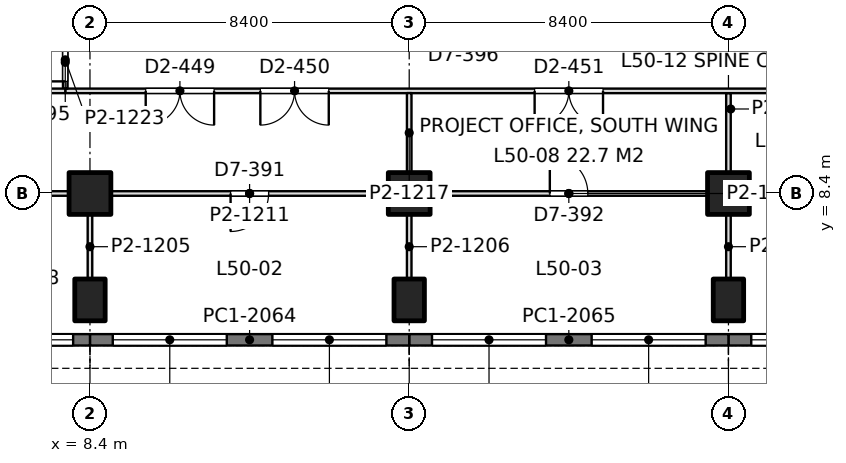
"""IFC4 building model, lengths in metres.
Left out: names, types, materials, properties, quantities, classifications, styles, units other than length and angle.
Written with IfcOpenShell. Run it as: python <this file> out.ifc"""

import sys

from ifc_helpers import new_model, si_unit, direction, frame, frame_2d, origin, origin_2d, place, context, subcontext, project, spatial, rectangle, extrude, element, fill, save


model = new_model("IFC4")
c1 = context("Model", 3, precision=1e-05, world=origin(), true_north=direction((0.0, 1.0)))
c2 = subcontext(c1, "Body", "Model", "MODEL_VIEW")
j1 = project(units=[si_unit("LENGTHUNIT", "METRE"), si_unit("PLANEANGLEUNIT", "RADIAN")], contexts=[c1])
p1 = place(None, origin())
s1 = spatial("IfcSite", under=j1, at=p1, CompositionType="ELEMENT")
p2 = place(p1, origin())
s2 = spatial("IfcBuilding", under=s1, at=p2, CompositionType="ELEMENT")
p3 = place(p2, frame((0.0, 0.0, 219.6)))
s3 = spatial("IfcBuildingStorey", under=s2, at=p3, CompositionType="ELEMENT", Elevation=219.6)
p4 = place(p3, frame((8.4, 5.6, 0.0), z_axis=(0.0, 0.0, 1.0), x_axis=(1.0, 0.0, 0.0)))
e1 = element("IfcColumn", 1, at=p4, inside=s3, PredefinedType="COLUMN", context=c2, shape_type="SweptSolid", body=[
    extrude(rectangle(XDim=0.8, YDim=1.1, at=origin_2d()), origin(), (0.0, 0.0, 1.0), 4.2),
])
p5 = place(p3, frame((8.4, 8.4, 0.0), z_axis=(0.0, 0.0, 1.0), x_axis=(1.0, 0.0, 0.0)))
e2 = element("IfcColumn", 2, at=p5, inside=s3, PredefinedType="COLUMN", context=c2, shape_type="SweptSolid", body=[
    extrude(rectangle(XDim=1.1, YDim=1.1, at=origin_2d()), origin(), (0.0, 0.0, 1.0), 4.2),
])
p6 = place(p3, frame((16.8, 5.6, 0.0), z_axis=(0.0, 0.0, 1.0), x_axis=(1.0, 0.0, 0.0)))
e3 = element("IfcColumn", 3, at=p6, inside=s3, PredefinedType="COLUMN", context=c2, shape_type="SweptSolid", body=[
    extrude(rectangle(XDim=0.8, YDim=1.1, at=origin_2d()), origin(), (0.0, 0.0, 1.0), 4.2),
])
p7 = place(p3, frame((16.8, 8.4, 0.0), z_axis=(0.0, 0.0, 1.0), x_axis=(1.0, 0.0, 0.0)))
e4 = element("IfcColumn", 4, at=p7, inside=s3, PredefinedType="COLUMN", context=c2, shape_type="SweptSolid", body=[
    extrude(rectangle(XDim=1.1, YDim=1.1, at=origin_2d()), origin(), (0.0, 0.0, 1.0), 4.2),
])
p8 = place(p3, frame((25.2, 5.6, 0.0), z_axis=(0.0, 0.0, 1.0), x_axis=(1.0, 0.0, 0.0)))
e5 = element("IfcColumn", 5, at=p8, inside=s3, PredefinedType="COLUMN", context=c2, shape_type="SweptSolid", body=[
    extrude(rectangle(XDim=0.8, YDim=1.1, at=origin_2d()), origin(), (0.0, 0.0, 1.0), 4.2),
])
p9 = place(p3, frame((25.2, 8.4, 0.0), z_axis=(0.0, 0.0, 1.0), x_axis=(1.0, 0.0, 0.0)))
e6 = element("IfcColumn", 6, at=p9, inside=s3, PredefinedType="COLUMN", context=c2, shape_type="SweptSolid", body=[
    extrude(rectangle(XDim=1.1, YDim=1.1, at=origin_2d()), origin(), (0.0, 0.0, 1.0), 4.2),
])
p10 = place(p3, frame((33.6, 4.55, 0.0), z_axis=(0.0, 0.0, 1.0), x_axis=(-1.0, 0.0, 0.0)))
e7 = element("IfcWall", 7, at=p10, inside=s3, PredefinedType="SOLIDWALL", context=c2, shape_type="SweptSolid", body=[
    extrude(rectangle(XDim=8.4, YDim=0.3, at=frame_2d((4.2, 0.0))), origin(), (0.0, 0.0, 1.0), 4.05),
])
p11 = place(p10, frame((0.6, 0.0, 0.9)))
e8 = element("IfcOpeningElement", 8, at=p11, cuts=e7, PredefinedType="OPENING", context=c2, shape_type="SweptSolid", body=[
    extrude(rectangle(XDim=3.0, YDim=1.9, at=frame_2d((1.5, 0.95))), frame((0.0, 0.16, 0.0), z_axis=(0.0, -1.0, 0.0), x_axis=(1.0, 0.0, 0.0)), (0.0, 0.0, 1.0), 0.32),
])
p12 = place(p10, frame((4.8, 0.0, 0.9)))
e9 = element("IfcOpeningElement", 9, at=p12, cuts=e7, PredefinedType="OPENING", context=c2, shape_type="SweptSolid", body=[
    extrude(rectangle(XDim=3.0, YDim=1.9, at=frame_2d((1.5, 0.95))), frame((0.0, 0.16, 0.0), z_axis=(0.0, -1.0, 0.0), x_axis=(1.0, 0.0, 0.0)), (0.0, 0.0, 1.0), 0.32),
])
p13 = place(p3, frame((25.2, 4.55, 0.0), z_axis=(0.0, 0.0, 1.0), x_axis=(-1.0, 0.0, 0.0)))
e10 = element("IfcWall", 10, at=p13, inside=s3, PredefinedType="SOLIDWALL", context=c2, shape_type="SweptSolid", body=[
    extrude(rectangle(XDim=8.4, YDim=0.3, at=frame_2d((4.2, 0.0))), origin(), (0.0, 0.0, 1.0), 4.05),
])
p14 = place(p13, frame((0.6, 0.0, 0.9)))
e11 = element("IfcOpeningElement", 11, at=p14, cuts=e10, PredefinedType="OPENING", context=c2, shape_type="SweptSolid", body=[
    extrude(rectangle(XDim=3.0, YDim=1.9, at=frame_2d((1.5, 0.95))), frame((0.0, 0.16, 0.0), z_axis=(0.0, -1.0, 0.0), x_axis=(1.0, 0.0, 0.0)), (0.0, 0.0, 1.0), 0.32),
])
p15 = place(p13, frame((4.8, 0.0, 0.9)))
e12 = element("IfcOpeningElement", 12, at=p15, cuts=e10, PredefinedType="OPENING", context=c2, shape_type="SweptSolid", body=[
    extrude(rectangle(XDim=3.0, YDim=1.9, at=frame_2d((1.5, 0.95))), frame((0.0, 0.16, 0.0), z_axis=(0.0, -1.0, 0.0), x_axis=(1.0, 0.0, 0.0)), (0.0, 0.0, 1.0), 0.32),
])
p16 = place(p3, frame((16.8, 4.55, 0.0), z_axis=(0.0, 0.0, 1.0), x_axis=(-1.0, 0.0, 0.0)))
e13 = element("IfcWall", 13, at=p16, inside=s3, PredefinedType="SOLIDWALL", context=c2, shape_type="SweptSolid", body=[
    extrude(rectangle(XDim=8.4, YDim=0.3, at=frame_2d((4.2, 0.0))), origin(), (0.0, 0.0, 1.0), 4.05),
])
p17 = place(p16, frame((0.6, 0.0, 0.9)))
e14 = element("IfcOpeningElement", 14, at=p17, cuts=e13, PredefinedType="OPENING", context=c2, shape_type="SweptSolid", body=[
    extrude(rectangle(XDim=3.0, YDim=1.9, at=frame_2d((1.5, 0.95))), frame((0.0, 0.16, 0.0), z_axis=(0.0, -1.0, 0.0), x_axis=(1.0, 0.0, 0.0)), (0.0, 0.0, 1.0), 0.32),
])
p18 = place(p16, frame((4.8, 0.0, 0.9)))
e15 = element("IfcOpeningElement", 15, at=p18, cuts=e13, PredefinedType="OPENING", context=c2, shape_type="SweptSolid", body=[
    extrude(rectangle(XDim=3.0, YDim=1.9, at=frame_2d((1.5, 0.95))), frame((0.0, 0.16, 0.0), z_axis=(0.0, -1.0, 0.0), x_axis=(1.0, 0.0, 0.0)), (0.0, 0.0, 1.0), 0.32),
])
p19 = place(p3, frame((8.4, 4.55, 0.0), z_axis=(0.0, 0.0, 1.0), x_axis=(-1.0, 0.0, 0.0)))
e16 = element("IfcWall", 16, at=p19, inside=s3, PredefinedType="SOLIDWALL", context=c2, shape_type="SweptSolid", body=[
    extrude(rectangle(XDim=8.085, YDim=0.3, at=frame_2d((4.042, 0.0))), origin(), (0.0, 0.0, 1.0), 4.05),
])
p20 = place(p19, frame((0.443, 0.0, 0.9)))
e17 = element("IfcOpeningElement", 17, at=p20, cuts=e16, PredefinedType="OPENING", context=c2, shape_type="SweptSolid", body=[
    extrude(rectangle(XDim=3.0, YDim=1.9, at=frame_2d((1.5, 0.95))), frame((0.0, 0.16, 0.0), z_axis=(0.0, -1.0, 0.0), x_axis=(1.0, 0.0, 0.0)), (0.0, 0.0, 1.0), 0.32),
])
p21 = place(p19, frame((4.643, 0.0, 0.9)))
e18 = element("IfcOpeningElement", 18, at=p21, cuts=e16, PredefinedType="OPENING", context=c2, shape_type="SweptSolid", body=[
    extrude(rectangle(XDim=3.0, YDim=1.9, at=frame_2d((1.5, 0.95))), frame((0.0, 0.16, 0.0), z_axis=(0.0, -1.0, 0.0), x_axis=(1.0, 0.0, 0.0)), (0.0, 0.0, 1.0), 0.32),
])
p22 = place(p3, frame((0.549, 8.4, 0.0), z_axis=(0.0, 0.0, 1.0), x_axis=(1.0, 0.0, 0.0)))
e19 = element("IfcWall", 19, at=p22, inside=s3, PredefinedType="PARTITIONING", context=c2, shape_type="SweptSolid", body=[
    extrude(rectangle(XDim=7.302, YDim=0.12, at=frame_2d((3.651, 0.0))), origin(), (0.0, 0.0, 1.0), 3.55),
])
p23 = place(p22, frame((2.701, 0.0, 0.0)))
e20 = element("IfcOpeningElement", 20, at=p23, cuts=e19, PredefinedType="OPENING", context=c2, shape_type="SweptSolid", body=[
    extrude(rectangle(XDim=1.0, YDim=2.4, at=frame_2d((0.5, 1.2))), frame((0.0, 0.07, 0.0), z_axis=(0.0, -1.0, 0.0), x_axis=(1.0, 0.0, 0.0)), (0.0, 0.0, 1.0), 0.14),
])
p24 = place(p3, frame((8.949, 8.4, 0.0), z_axis=(0.0, 0.0, 1.0), x_axis=(1.0, 0.0, 0.0)))
e21 = element("IfcWall", 21, at=p24, inside=s3, PredefinedType="PARTITIONING", context=c2, shape_type="SweptSolid", body=[
    extrude(rectangle(XDim=7.302, YDim=0.12, at=frame_2d((3.651, 0.0))), origin(), (0.0, 0.0, 1.0), 3.55),
])
p25 = place(p24, frame((3.151, 0.0, 0.0)))
e22 = element("IfcOpeningElement", 22, at=p25, cuts=e21, PredefinedType="OPENING", context=c2, shape_type="SweptSolid", body=[
    extrude(rectangle(XDim=1.0, YDim=2.4, at=frame_2d((0.5, 1.2))), frame((0.0, 0.07, 0.0), z_axis=(0.0, -1.0, 0.0), x_axis=(1.0, 0.0, 0.0)), (0.0, 0.0, 1.0), 0.14),
])
p26 = place(p3, frame((17.349, 8.4, 0.0), z_axis=(0.0, 0.0, 1.0), x_axis=(1.0, 0.0, 0.0)))
e23 = element("IfcWall", 23, at=p26, inside=s3, PredefinedType="PARTITIONING", context=c2, shape_type="SweptSolid", body=[
    extrude(rectangle(XDim=7.302, YDim=0.12, at=frame_2d((3.651, 0.0))), origin(), (0.0, 0.0, 1.0), 3.55),
])
p27 = place(p26, frame((3.151, 0.0, 0.0)))
e24 = element("IfcOpeningElement", 24, at=p27, cuts=e23, PredefinedType="OPENING", context=c2, shape_type="SweptSolid", body=[
    extrude(rectangle(XDim=1.0, YDim=2.4, at=frame_2d((0.5, 1.2))), frame((0.0, 0.07, 0.0), z_axis=(0.0, -1.0, 0.0), x_axis=(1.0, 0.0, 0.0)), (0.0, 0.0, 1.0), 0.14),
])
p28 = place(p3, frame((25.749, 8.4, 0.0), z_axis=(0.0, 0.0, 1.0), x_axis=(1.0, 0.0, 0.0)))
e25 = element("IfcWall", 25, at=p28, inside=s3, PredefinedType="PARTITIONING", context=c2, shape_type="SweptSolid", body=[
    extrude(rectangle(XDim=7.302, YDim=0.12, at=frame_2d((3.651, 0.0))), origin(), (0.0, 0.0, 1.0), 3.55),
])
p29 = place(p28, frame((3.151, 0.0, 0.0)))
e26 = element("IfcOpeningElement", 26, at=p29, cuts=e25, PredefinedType="OPENING", context=c2, shape_type="SweptSolid", body=[
    extrude(rectangle(XDim=1.0, YDim=2.4, at=frame_2d((0.5, 1.2))), frame((0.0, 0.07, 0.0), z_axis=(0.0, -1.0, 0.0), x_axis=(1.0, 0.0, 0.0)), (0.0, 0.0, 1.0), 0.14),
])
for number, where, z_axis, x_axis in (
    (27, (8.4, 6.149, 0.0), (0.0, 0.0, 1.0), (0.0, 1.0, 0.0)),
    (28, (16.8, 6.149, 0.0), (0.0, 0.0, 1.0), (0.0, 1.0, 0.0)),
    (29, (25.2, 6.149, 0.0), (0.0, 0.0, 1.0), (0.0, 1.0, 0.0)),
):
    element("IfcWall", number, at=place(p3, frame(where, z_axis=z_axis, x_axis=x_axis)), inside=s3, PredefinedType="PARTITIONING", context=c2, shape_type="SweptSolid", body=[
        extrude(rectangle(XDim=1.702, YDim=0.12, at=frame_2d((0.851, 0.0))), origin(), (0.0, 0.0, 1.0), 3.69),
    ])
p30 = place(p3, frame((16.8, 8.949, 0.0), z_axis=(0.0, 0.0, 1.0), x_axis=(0.0, 1.0, 0.0)))
e30 = element("IfcWall", 30, at=p30, inside=s3, PredefinedType="PARTITIONING", context=c2, shape_type="SweptSolid", body=[
    extrude(rectangle(XDim=2.093, YDim=0.12, at=frame_2d((1.046, 0.0))), origin(), (0.0, 0.0, 1.0), 3.69),
])
p31 = place(p3, frame((25.2, 8.949, 0.0), z_axis=(0.0, 0.0, 1.0), x_axis=(0.0, 1.0, 0.0)))
e31 = element("IfcWall", 31, at=p31, inside=s3, PredefinedType="PARTITIONING", context=c2, shape_type="SweptSolid", body=[
    extrude(rectangle(XDim=2.093, YDim=0.12, at=frame_2d((1.046, 0.0))), origin(), (0.0, 0.0, 1.0), 3.55),
])
p32 = place(p3, frame((7.748, 11.1, 0.0), z_axis=(0.0, 0.0, 1.0), x_axis=(1.0, 0.0, 0.0)))
e32 = element("IfcWall", 32, at=p32, inside=s3, PredefinedType="PARTITIONING", context=c2, shape_type="SweptSolid", body=[
    extrude(rectangle(XDim=41.452, YDim=0.12, at=frame_2d((20.726, 0.0))), origin(), (0.0, 0.0, 1.0), 3.55),
])
p33 = place(p32, frame((2.119, 0.0, 0.0)))
e33 = element("IfcOpeningElement", 33, at=p33, cuts=e32, PredefinedType="OPENING", context=c2, shape_type="SweptSolid", body=[
    extrude(rectangle(XDim=1.8, YDim=2.2, at=frame_2d((0.9, 1.1))), frame((0.0, 0.07, 0.0), z_axis=(0.0, -1.0, 0.0), x_axis=(1.0, 0.0, 0.0)), (0.0, 0.0, 1.0), 0.14),
])
p34 = place(p32, frame((5.135, 0.0, 0.0)))
e34 = element("IfcOpeningElement", 34, at=p34, cuts=e32, PredefinedType="OPENING", context=c2, shape_type="SweptSolid", body=[
    extrude(rectangle(XDim=1.8, YDim=2.2, at=frame_2d((0.9, 1.1))), frame((0.0, 0.07, 0.0), z_axis=(0.0, -1.0, 0.0), x_axis=(1.0, 0.0, 0.0)), (0.0, 0.0, 1.0), 0.14),
])
p35 = place(p32, frame((12.352, 0.0, 0.0)))
e35 = element("IfcOpeningElement", 35, at=p35, cuts=e32, PredefinedType="OPENING", context=c2, shape_type="SweptSolid", body=[
    extrude(rectangle(XDim=1.8, YDim=2.2, at=frame_2d((0.9, 1.1))), frame((0.0, 0.07, 0.0), z_axis=(0.0, -1.0, 0.0), x_axis=(1.0, 0.0, 0.0)), (0.0, 0.0, 1.0), 0.14),
])
p36 = place(p32, frame((20.752, 0.0, 0.0)))
e36 = element("IfcOpeningElement", 36, at=p36, cuts=e32, PredefinedType="OPENING", context=c2, shape_type="SweptSolid", body=[
    extrude(rectangle(XDim=1.8, YDim=2.2, at=frame_2d((0.9, 1.1))), frame((0.0, 0.07, 0.0), z_axis=(0.0, -1.0, 0.0), x_axis=(1.0, 0.0, 0.0)), (0.0, 0.0, 1.0), 0.14),
])
p37 = place(p32, frame((24.952, 0.0, 0.0)))
e37 = element("IfcOpeningElement", 37, at=p37, cuts=e32, PredefinedType="OPENING", context=c2, shape_type="SweptSolid", body=[
    extrude(rectangle(XDim=1.8, YDim=2.2, at=frame_2d((0.9, 1.1))), frame((0.0, 0.07, 0.0), z_axis=(0.0, -1.0, 0.0), x_axis=(1.0, 0.0, 0.0)), (0.0, 0.0, 1.0), 0.14),
])
p38 = place(p32, frame((32.952, 0.0, 0.0)))
e38 = element("IfcOpeningElement", 38, at=p38, cuts=e32, PredefinedType="OPENING", context=c2, shape_type="SweptSolid", body=[
    extrude(rectangle(XDim=1.8, YDim=2.2, at=frame_2d((0.9, 1.1))), frame((0.0, 0.07, 0.0), z_axis=(0.0, -1.0, 0.0), x_axis=(1.0, 0.0, 0.0)), (0.0, 0.0, 1.0), 0.14),
])
p39 = place(p32, frame((36.752, 0.0, 0.0)))
e39 = element("IfcOpeningElement", 39, at=p39, cuts=e32, PredefinedType="OPENING", context=c2, shape_type="SweptSolid", body=[
    extrude(rectangle(XDim=1.8, YDim=2.2, at=frame_2d((0.9, 1.1))), frame((0.0, 0.07, 0.0), z_axis=(0.0, -1.0, 0.0), x_axis=(1.0, 0.0, 0.0)), (0.0, 0.0, 1.0), 0.14),
])
p40 = place(p3, frame((7.75, 11.158, 0.0), z_axis=(0.0, 0.0, 1.0), x_axis=(0.0, 1.0, 0.0)))
e40 = element("IfcWall", 40, at=p40, inside=s3, PredefinedType="PARTITIONING", context=c2, shape_type="SweptSolid", body=[
    extrude(rectangle(XDim=1.518, YDim=0.12, at=frame_2d((0.759, 0.0))), origin(), (0.0, 0.0, 1.0), 4.05),
])
p41 = place(p40, frame((0.192, 0.0, 0.0)))
e41 = element("IfcOpeningElement", 41, at=p41, cuts=e40, PredefinedType="OPENING", context=c2, shape_type="SweptSolid", body=[
    extrude(rectangle(XDim=1.0, YDim=2.4, at=frame_2d((0.5, 1.2))), frame((0.0, 0.07, 0.0), z_axis=(0.0, -1.0, 0.0), x_axis=(1.0, 0.0, 0.0)), (0.0, 0.0, 1.0), 0.14),
])
p42 = place(p3, frame((1.2, 11.1, 0.0), z_axis=(0.0, 0.0, 1.0), x_axis=(1.0, 0.0, 0.0)))
e42 = element("IfcWall", 42, at=p42, inside=s3, PredefinedType="PARTITIONING", context=c2, shape_type="SweptSolid", body=[
    extrude(rectangle(XDim=6.552, YDim=0.12, at=frame_2d((3.276, 0.0))), origin(), (0.0, 0.0, 1.0), 4.05),
])
p43 = place(p12, origin())
e43 = element("IfcWindow", 43, at=p43, inside=s3, PartitioningType="SINGLE_PANEL", PredefinedType="WINDOW", context=c2, shape_type="SweptSolid", body=[
    extrude(rectangle(XDim=3.0, YDim=1.9, at=frame_2d((1.5, 0.95))), frame((0.0, 0.03, 0.0), z_axis=(0.0, -1.0, 0.0), x_axis=(1.0, 0.0, 0.0)), (0.0, 0.0, 1.0), 0.06),
])
fill(e9, e43)
p44 = place(p14, origin())
e44 = element("IfcWindow", 44, at=p44, inside=s3, PartitioningType="SINGLE_PANEL", PredefinedType="WINDOW", context=c2, shape_type="SweptSolid", body=[
    extrude(rectangle(XDim=3.0, YDim=1.9, at=frame_2d((1.5, 0.95))), frame((0.0, 0.03, 0.0), z_axis=(0.0, -1.0, 0.0), x_axis=(1.0, 0.0, 0.0)), (0.0, 0.0, 1.0), 0.06),
])
fill(e11, e44)
p45 = place(p15, origin())
e45 = element("IfcWindow", 45, at=p45, inside=s3, PartitioningType="SINGLE_PANEL", PredefinedType="WINDOW", context=c2, shape_type="SweptSolid", body=[
    extrude(rectangle(XDim=3.0, YDim=1.9, at=frame_2d((1.5, 0.95))), frame((0.0, 0.03, 0.0), z_axis=(0.0, -1.0, 0.0), x_axis=(1.0, 0.0, 0.0)), (0.0, 0.0, 1.0), 0.06),
])
fill(e12, e45)
p46 = place(p17, origin())
e46 = element("IfcWindow", 46, at=p46, inside=s3, PartitioningType="SINGLE_PANEL", PredefinedType="WINDOW", context=c2, shape_type="SweptSolid", body=[
    extrude(rectangle(XDim=3.0, YDim=1.9, at=frame_2d((1.5, 0.95))), frame((0.0, 0.03, 0.0), z_axis=(0.0, -1.0, 0.0), x_axis=(1.0, 0.0, 0.0)), (0.0, 0.0, 1.0), 0.06),
])
fill(e14, e46)
p47 = place(p18, origin())
e47 = element("IfcWindow", 47, at=p47, inside=s3, PartitioningType="SINGLE_PANEL", PredefinedType="WINDOW", context=c2, shape_type="SweptSolid", body=[
    extrude(rectangle(XDim=3.0, YDim=1.9, at=frame_2d((1.5, 0.95))), frame((0.0, 0.03, 0.0), z_axis=(0.0, -1.0, 0.0), x_axis=(1.0, 0.0, 0.0)), (0.0, 0.0, 1.0), 0.06),
])
fill(e15, e47)
p48 = place(p20, origin())
e48 = element("IfcWindow", 48, at=p48, inside=s3, PartitioningType="SINGLE_PANEL", PredefinedType="WINDOW", context=c2, shape_type="SweptSolid", body=[
    extrude(rectangle(XDim=3.0, YDim=1.9, at=frame_2d((1.5, 0.95))), frame((0.0, 0.03, 0.0), z_axis=(0.0, -1.0, 0.0), x_axis=(1.0, 0.0, 0.0)), (0.0, 0.0, 1.0), 0.06),
])
fill(e17, e48)
p49 = place(p25, frame((1.0, 0.0, 0.0), z_axis=(0.0, 0.0, 1.0), x_axis=(-1.0, 0.0, 0.0)))
e49 = element("IfcDoor", 49, at=p49, inside=s3, OperationType="SINGLE_SWING_RIGHT", PredefinedType="DOOR", context=c2, shape_type="SweptSolid", body=[
    extrude(rectangle(XDim=1.0, YDim=2.4, at=frame_2d((0.5, 1.2))), frame((0.0, 0.025, 0.0), z_axis=(0.0, -1.0, 0.0), x_axis=(1.0, 0.0, 0.0)), (0.0, 0.0, 1.0), 0.05),
])
fill(e22, e49)
p50 = place(p27, origin())
e50 = element("IfcDoor", 50, at=p50, inside=s3, OperationType="SINGLE_SWING_LEFT", PredefinedType="DOOR", context=c2, shape_type="SweptSolid", body=[
    extrude(rectangle(XDim=1.0, YDim=2.4, at=frame_2d((0.5, 1.2))), frame((0.0, 0.025, 0.0), z_axis=(0.0, -1.0, 0.0), x_axis=(1.0, 0.0, 0.0)), (0.0, 0.0, 1.0), 0.05),
])
fill(e24, e50)
p51 = place(p33, frame((1.8, 0.0, 0.0), z_axis=(0.0, 0.0, 1.0), x_axis=(-1.0, 0.0, 0.0)))
e51 = element("IfcDoor", 51, at=p51, inside=s3, OperationType="DOUBLE_DOOR_SINGLE_SWING", PredefinedType="DOOR", context=c2, shape_type="SweptSolid", body=[
    extrude(rectangle(XDim=1.8, YDim=2.2, at=frame_2d((0.9, 1.1))), frame((0.0, 0.025, 0.0), z_axis=(0.0, -1.0, 0.0), x_axis=(1.0, 0.0, 0.0)), (0.0, 0.0, 1.0), 0.05),
])
fill(e33, e51)
p52 = place(p34, frame((1.8, 0.0, 0.0), z_axis=(0.0, 0.0, 1.0), x_axis=(-1.0, 0.0, 0.0)))
e52 = element("IfcDoor", 52, at=p52, inside=s3, OperationType="DOUBLE_DOOR_SINGLE_SWING", PredefinedType="DOOR", context=c2, shape_type="SweptSolid", body=[
    extrude(rectangle(XDim=1.8, YDim=2.2, at=frame_2d((0.9, 1.1))), frame((0.0, 0.025, 0.0), z_axis=(0.0, -1.0, 0.0), x_axis=(1.0, 0.0, 0.0)), (0.0, 0.0, 1.0), 0.05),
])
fill(e34, e52)
p53 = place(p35, frame((1.8, 0.0, 0.0), z_axis=(0.0, 0.0, 1.0), x_axis=(-1.0, 0.0, 0.0)))
e53 = element("IfcDoor", 53, at=p53, inside=s3, OperationType="DOUBLE_DOOR_SINGLE_SWING", PredefinedType="DOOR", context=c2, shape_type="SweptSolid", body=[
    extrude(rectangle(XDim=1.8, YDim=2.2, at=frame_2d((0.9, 1.1))), frame((0.0, 0.025, 0.0), z_axis=(0.0, -1.0, 0.0), x_axis=(1.0, 0.0, 0.0)), (0.0, 0.0, 1.0), 0.05),
])
fill(e35, e53)
p54 = place(p41, origin())
e54 = element("IfcDoor", 54, at=p54, inside=s3, OperationType="SINGLE_SWING_LEFT", PredefinedType="DOOR", context=c2, shape_type="SweptSolid", body=[
    extrude(rectangle(XDim=1.0, YDim=2.4, at=frame_2d((0.5, 1.2))), frame((0.0, 0.025, 0.0), z_axis=(0.0, -1.0, 0.0), x_axis=(1.0, 0.0, 0.0)), (0.0, 0.0, 1.0), 0.05),
])
fill(e41, e54)
save(model, sys.argv[1])
